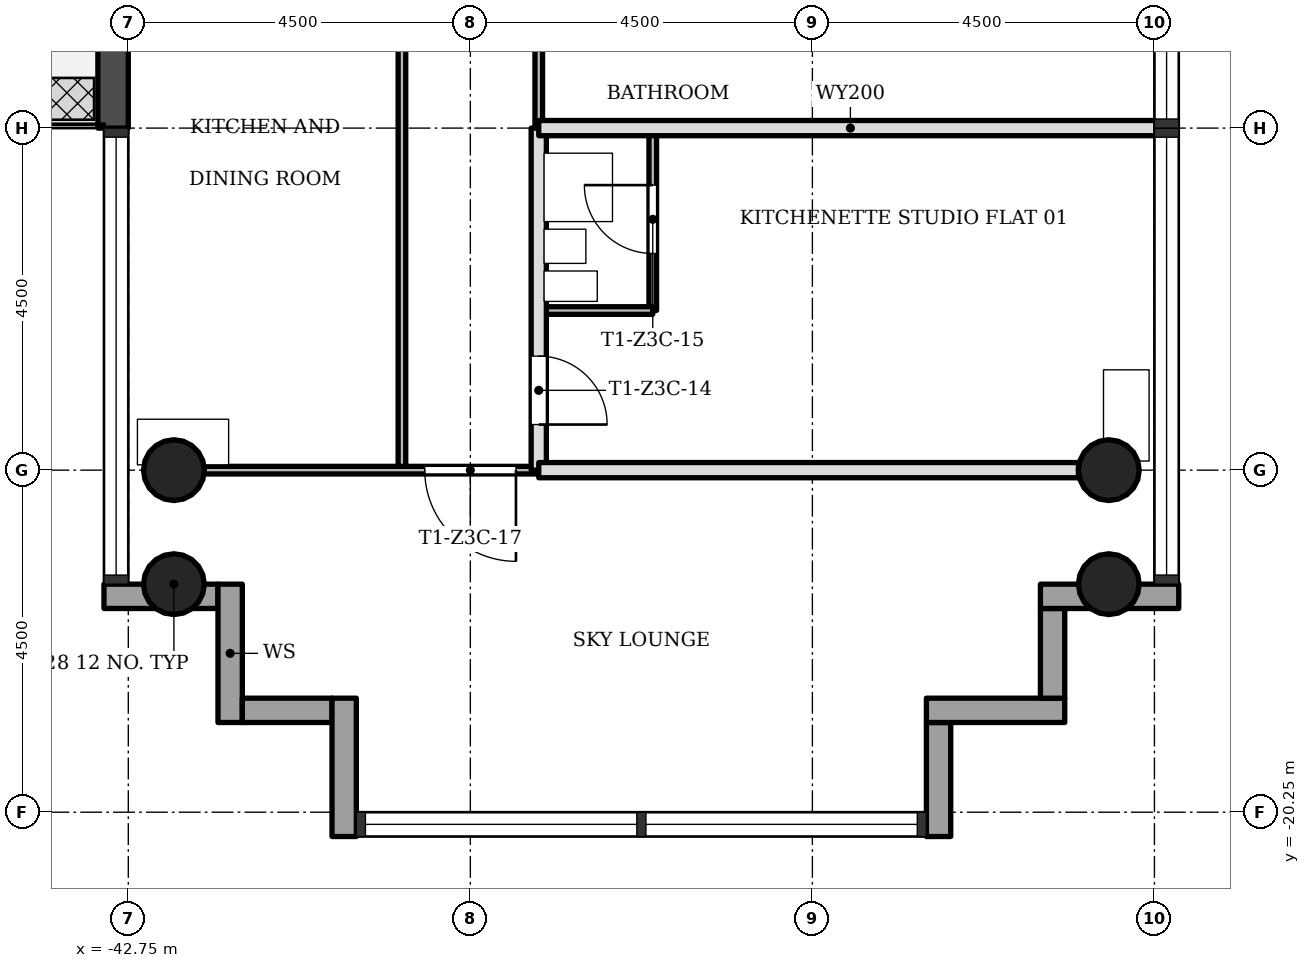
"""IFC4 building model, lengths in metres.
Left out: names, types, materials, properties, quantities, classifications, styles, units other than length and angle.
Written with IfcOpenShell. Run it as: python <this file> out.ifc"""

import sys

from ifc_helpers import new_model, si_unit, direction, frame, frame_2d, origin, origin_2d, place, context, subcontext, project, spatial, rectangle, hollow_circle, extrude, element, fill, save


model = new_model("IFC4")
c1 = context("Model", 3, precision=1e-05, world=origin(), true_north=direction((0.0, 1.0)))
c2 = subcontext(c1, "Body", "Model", "MODEL_VIEW")
j1 = project(units=[si_unit("LENGTHUNIT", "METRE"), si_unit("PLANEANGLEUNIT", "RADIAN")], contexts=[c1])
p1 = place(None, origin())
s1 = spatial("IfcSite", under=j1, at=p1, CompositionType="ELEMENT")
p2 = place(p1, origin())
s2 = spatial("IfcBuilding", under=s1, at=p2, CompositionType="ELEMENT")
p3 = place(p2, frame((0.0, 0.0, 160.9)))
s3 = spatial("IfcBuildingStorey", under=s2, at=p3, CompositionType="ELEMENT", Elevation=160.9)
for number, where, z_axis, x_axis in (
    (1, (-42.15, -15.75, 0.0), (0.0, 0.0, 1.0), (1.0, 0.0, 0.0)),
    (2, (-29.85, -15.75, 0.0), (0.0, 0.0, 1.0), (1.0, 0.0, 0.0)),
    (3, (-42.15, -17.25, 0.0), (0.0, 0.0, 1.0), (1.0, 0.0, 0.0)),
    (4, (-29.85, -17.25, 0.0), (0.0, 0.0, 1.0), (1.0, 0.0, 0.0)),
):
    element("IfcColumn", number, at=place(p3, frame(where, z_axis=z_axis, x_axis=x_axis)), inside=s3, PredefinedType="COLUMN", context=c2, shape_type="SweptSolid", body=[
        extrude(hollow_circle(Radius=0.4, WallThickness=0.028, at=origin_2d()), origin(), (0.0, 0.0, 1.0), 3.4),
    ])
p4 = place(p3, frame((-42.95, -6.75, -0.02), z_axis=(0.0, 0.0, 1.0), x_axis=(0.0, -1.0, 0.0)))
e5 = element("IfcWall", 5, at=p4, inside=s3, PredefinedType="STANDARD", context=c2, shape_type="SweptSolid", body=[
    extrude(rectangle(XDim=4.5, YDim=0.4, at=frame_2d((2.25, 0.0))), origin(), (0.0, 0.0, 1.0), 3.12),
])
p5 = place(p4, frame((1.35, 0.0, 0.02)))
e6 = element("IfcOpeningElement", 6, at=p5, cuts=e5, PredefinedType="OPENING", context=c2, shape_type="SweptSolid", body=[
    extrude(rectangle(XDim=1.8, YDim=2.1, at=frame_2d((0.9, 1.05))), frame((0.0, 0.21, 0.0), z_axis=(0.0, -1.0, 0.0), x_axis=(1.0, 0.0, 0.0)), (0.0, 0.0, 1.0), 0.42),
])
p6 = place(p3, frame((-43.07, -17.41, -0.3), z_axis=(0.0, 0.0, 1.0), x_axis=(1.0, 0.0, 0.0)))
e7 = element("IfcWall", 7, at=p6, inside=s3, PredefinedType="STANDARD", context=c2, shape_type="SweptSolid", body=[
    extrude(rectangle(XDim=1.5, YDim=0.32, at=frame_2d((0.75, 0.0))), origin(), (0.0, 0.0, 1.0), 3.4),
])
p7 = place(p3, frame((-41.41, -17.25, -0.3), z_axis=(0.0, 0.0, 1.0), x_axis=(0.0, -1.0, 0.0)))
e8 = element("IfcWall", 8, at=p7, inside=s3, PredefinedType="STANDARD", context=c2, shape_type="SweptSolid", body=[
    extrude(rectangle(XDim=1.82, YDim=0.32, at=frame_2d((0.91, 0.0))), origin(), (0.0, 0.0, 1.0), 3.4),
])
p8 = place(p3, frame((-41.25, -18.91, -0.3), z_axis=(0.0, 0.0, 1.0), x_axis=(1.0, 0.0, 0.0)))
e9 = element("IfcWall", 9, at=p8, inside=s3, PredefinedType="STANDARD", context=c2, shape_type="SweptSolid", body=[
    extrude(rectangle(XDim=1.18, YDim=0.32, at=frame_2d((0.59, 0.0))), origin(), (0.0, 0.0, 1.0), 3.4),
])
p9 = place(p3, frame((-39.91, -18.75, -0.3), z_axis=(0.0, 0.0, 1.0), x_axis=(0.0, -1.0, 0.0)))
e10 = element("IfcWall", 10, at=p9, inside=s3, PredefinedType="STANDARD", context=c2, shape_type="SweptSolid", body=[
    extrude(rectangle(XDim=1.82, YDim=0.32, at=frame_2d((0.91, 0.0))), origin(), (0.0, 0.0, 1.0), 3.4),
])
p10 = place(p3, frame((-32.09, -20.57, -0.3), z_axis=(0.0, 0.0, 1.0), x_axis=(0.0, 1.0, 0.0)))
e11 = element("IfcWall", 11, at=p10, inside=s3, PredefinedType="STANDARD", context=c2, shape_type="SweptSolid", body=[
    extrude(rectangle(XDim=1.5, YDim=0.32, at=frame_2d((0.75, 0.0))), origin(), (0.0, 0.0, 1.0), 3.4),
])
p11 = place(p3, frame((-32.25, -18.91, -0.3), z_axis=(0.0, 0.0, 1.0), x_axis=(1.0, 0.0, 0.0)))
e12 = element("IfcWall", 12, at=p11, inside=s3, PredefinedType="STANDARD", context=c2, shape_type="SweptSolid", body=[
    extrude(rectangle(XDim=1.82, YDim=0.32, at=frame_2d((0.91, 0.0))), origin(), (0.0, 0.0, 1.0), 3.4),
])
p12 = place(p3, frame((-30.59, -18.75, -0.3), z_axis=(0.0, 0.0, 1.0), x_axis=(0.0, 1.0, 0.0)))
e13 = element("IfcWall", 13, at=p12, inside=s3, PredefinedType="STANDARD", context=c2, shape_type="SweptSolid", body=[
    extrude(rectangle(XDim=1.18, YDim=0.32, at=frame_2d((0.59, 0.0))), origin(), (0.0, 0.0, 1.0), 3.4),
])
p13 = place(p3, frame((-30.75, -17.41, -0.3), z_axis=(0.0, 0.0, 1.0), x_axis=(1.0, 0.0, 0.0)))
e14 = element("IfcWall", 14, at=p13, inside=s3, PredefinedType="STANDARD", context=c2, shape_type="SweptSolid", body=[
    extrude(rectangle(XDim=1.82, YDim=0.32, at=frame_2d((0.91, 0.0))), origin(), (0.0, 0.0, 1.0), 3.4),
])
p14 = place(p3, frame((-39.15, -15.75, 0.0), z_axis=(0.0, 0.0, 1.0), x_axis=(0.0, 1.0, 0.0)))
e15 = element("IfcWall", 15, at=p14, inside=s3, PredefinedType="PARTITIONING", context=c2, shape_type="SweptSolid", body=[
    extrude(rectangle(XDim=9.0, YDim=0.1, at=frame_2d((4.5, 0.0))), origin(), (0.0, 0.0, 1.0), 3.0),
])
p15 = place(p14, frame((5.55, 0.0, 0.0)))
e16 = element("IfcOpeningElement", 16, at=p15, cuts=e15, PredefinedType="OPENING", context=c2, shape_type="SweptSolid", body=[
    extrude(rectangle(XDim=0.9, YDim=2.1, at=frame_2d((0.45, 1.05))), frame((0.0, 0.06, 0.0), z_axis=(0.0, -1.0, 0.0), x_axis=(1.0, 0.0, 0.0)), (0.0, 0.0, 1.0), 0.12),
])
p16 = place(p3, frame((-37.35, -11.25, 0.0), z_axis=(0.0, 0.0, 1.0), x_axis=(0.0, 1.0, 0.0)))
e17 = element("IfcWall", 17, at=p16, inside=s3, PredefinedType="PARTITIONING", context=c2, shape_type="SweptSolid", body=[
    extrude(rectangle(XDim=2.7, YDim=0.1, at=frame_2d((1.35, 0.0))), origin(), (0.0, 0.0, 1.0), 3.0),
])
p17 = place(p16, frame((1.73, 0.0, 0.0)))
e18 = element("IfcOpeningElement", 18, at=p17, cuts=e17, PredefinedType="OPENING", context=c2, shape_type="SweptSolid", body=[
    extrude(rectangle(XDim=0.9, YDim=2.1, at=frame_2d((0.45, 1.05))), frame((0.0, 0.06, 0.0), z_axis=(0.0, -1.0, 0.0), x_axis=(1.0, 0.0, 0.0)), (0.0, 0.0, 1.0), 0.12),
])
p18 = place(p3, frame((-37.35, -15.75, 0.0), z_axis=(0.0, 0.0, 1.0), x_axis=(0.0, 1.0, 0.0)))
e19 = element("IfcWall", 19, at=p18, inside=s3, PredefinedType="SOLIDWALL", context=c2, shape_type="SweptSolid", body=[
    extrude(rectangle(XDim=4.5, YDim=0.2, at=frame_2d((2.25, 0.0))), origin(), (0.0, 0.0, 1.0), 3.0),
])
p19 = place(p18, frame((0.6, 0.0, 0.0)))
e20 = element("IfcOpeningElement", 20, at=p19, cuts=e19, PredefinedType="OPENING", context=c2, shape_type="SweptSolid", body=[
    extrude(rectangle(XDim=0.9, YDim=2.1, at=frame_2d((0.45, 1.05))), frame((0.0, 0.11, 0.0), z_axis=(0.0, -1.0, 0.0), x_axis=(1.0, 0.0, 0.0)), (0.0, 0.0, 1.0), 0.22),
])
p20 = place(p3, frame((-35.85, -13.65, 0.0), z_axis=(0.0, 0.0, 1.0), x_axis=(0.0, 1.0, 0.0)))
e21 = element("IfcWall", 21, at=p20, inside=s3, PredefinedType="PARTITIONING", context=c2, shape_type="SweptSolid", body=[
    extrude(rectangle(XDim=2.4, YDim=0.1, at=frame_2d((1.2, 0.0))), origin(), (0.0, 0.0, 1.0), 3.0),
])
p21 = place(p20, frame((0.75, 0.0, 0.0)))
e22 = element("IfcOpeningElement", 22, at=p21, cuts=e21, PredefinedType="OPENING", context=c2, shape_type="SweptSolid", body=[
    extrude(rectangle(XDim=0.9, YDim=2.1, at=frame_2d((0.45, 1.05))), frame((0.0, 0.06, 0.0), z_axis=(0.0, -1.0, 0.0), x_axis=(1.0, 0.0, 0.0)), (0.0, 0.0, 1.0), 0.12),
])
p22 = place(p3, frame((-41.75, -15.75, 0.0), z_axis=(0.0, 0.0, 1.0), x_axis=(1.0, 0.0, 0.0)))
e23 = element("IfcWall", 23, at=p22, inside=s3, PredefinedType="PARTITIONING", context=c2, shape_type="SweptSolid", body=[
    extrude(rectangle(XDim=4.4, YDim=0.1, at=frame_2d((2.2, 0.0))), origin(), (0.0, 0.0, 1.0), 3.0),
])
p23 = place(p22, frame((2.9, 0.0, 0.0)))
e24 = element("IfcOpeningElement", 24, at=p23, cuts=e23, PredefinedType="OPENING", context=c2, shape_type="SweptSolid", body=[
    extrude(rectangle(XDim=1.2, YDim=2.1, at=frame_2d((0.6, 1.05))), frame((0.0, 0.06, 0.0), z_axis=(0.0, -1.0, 0.0), x_axis=(1.0, 0.0, 0.0)), (0.0, 0.0, 1.0), 0.12),
])
p24 = place(p3, frame((-37.35, -15.75, 0.0), z_axis=(0.0, 0.0, 1.0), x_axis=(1.0, 0.0, 0.0)))
e25 = element("IfcWall", 25, at=p24, inside=s3, PredefinedType="SOLIDWALL", context=c2, shape_type="SweptSolid", body=[
    extrude(rectangle(XDim=7.1, YDim=0.2, at=frame_2d((3.55, 0.0))), origin(), (0.0, 0.0, 1.0), 3.0),
])
p25 = place(p3, frame((-37.35, -13.65, 0.0), z_axis=(0.0, 0.0, 1.0), x_axis=(1.0, 0.0, 0.0)))
e26 = element("IfcWall", 26, at=p25, inside=s3, PredefinedType="PARTITIONING", context=c2, shape_type="SweptSolid", body=[
    extrude(rectangle(XDim=1.5, YDim=0.1, at=frame_2d((0.75, 0.0))), origin(), (0.0, 0.0, 1.0), 3.0),
])
p26 = place(p3, frame((-37.35, -11.25, 0.0), z_axis=(0.0, 0.0, 1.0), x_axis=(1.0, 0.0, 0.0)))
e27 = element("IfcWall", 27, at=p26, inside=s3, PredefinedType="SOLIDWALL", context=c2, shape_type="SweptSolid", body=[
    extrude(rectangle(XDim=8.2, YDim=0.2, at=frame_2d((4.1, 0.0))), origin(), (0.0, 0.0, 1.0), 3.0),
])
p27 = place(p19, origin())
e28 = element("IfcDoor", 28, at=p27, inside=s3, OperationType="SINGLE_SWING_LEFT", PredefinedType="DOOR", context=c2, shape_type="SweptSolid", body=[
    extrude(rectangle(XDim=0.9, YDim=2.1, at=frame_2d((0.45, 1.05))), frame((0.0, 0.025, 0.0), z_axis=(0.0, -1.0, 0.0), x_axis=(1.0, 0.0, 0.0)), (0.0, 0.0, 1.0), 0.05),
])
fill(e20, e28)
p28 = place(p21, origin())
e29 = element("IfcDoor", 29, at=p28, inside=s3, OperationType="SINGLE_SWING_LEFT", PredefinedType="DOOR", context=c2, shape_type="SweptSolid", body=[
    extrude(rectangle(XDim=0.9, YDim=2.1, at=frame_2d((0.45, 1.05))), frame((0.0, 0.025, 0.0), z_axis=(0.0, -1.0, 0.0), x_axis=(1.0, 0.0, 0.0)), (0.0, 0.0, 1.0), 0.05),
])
fill(e22, e29)
p29 = place(p23, origin())
e30 = element("IfcDoor", 30, at=p29, inside=s3, OperationType="SINGLE_SWING_RIGHT", PredefinedType="DOOR", context=c2, shape_type="SweptSolid", body=[
    extrude(rectangle(XDim=1.2, YDim=2.1, at=frame_2d((0.6, 1.05))), frame((0.0, 0.025, 0.0), z_axis=(0.0, -1.0, 0.0), x_axis=(1.0, 0.0, 0.0)), (0.0, 0.0, 1.0), 0.05),
])
fill(e24, e30)
save(model, sys.argv[1])
